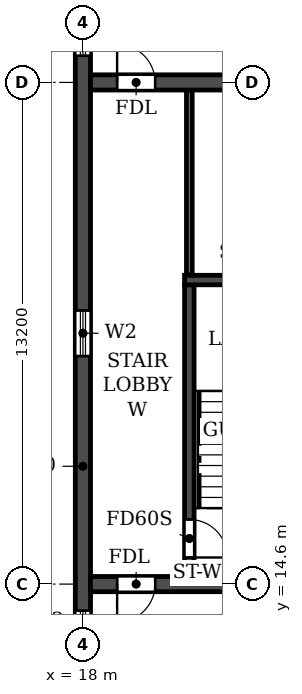
"""IFC4 building model, lengths in metres.
Left out: names, types, materials, properties, quantities, classifications, styles, units other than length and angle.
Written with IfcOpenShell. Run it as: python <this file> out.ifc"""

import sys

from ifc_helpers import new_model, si_unit, direction, frame, frame_2d, origin, place, context, subcontext, project, spatial, rectangle, extrude, element, fill, save


model = new_model("IFC4")
c1 = context("Model", 3, precision=1e-05, world=origin(), true_north=direction((0.0, 1.0)))
c2 = subcontext(c1, "Body", "Model", "MODEL_VIEW")
j1 = project(units=[si_unit("LENGTHUNIT", "METRE"), si_unit("PLANEANGLEUNIT", "RADIAN")], contexts=[c1])
p1 = place(None, origin())
s1 = spatial("IfcSite", under=j1, at=p1, CompositionType="ELEMENT")
p2 = place(p1, origin())
s2 = spatial("IfcBuilding", under=s1, at=p2, CompositionType="ELEMENT")
p3 = place(p2, frame((0.0, 0.0, 208.2)))
s3 = spatial("IfcBuildingStorey", under=s2, at=p3, CompositionType="ELEMENT", Elevation=208.2)
p4 = place(p3, frame((18.0, 4.683, 0.0), z_axis=(0.0, 0.0, 1.0), x_axis=(0.0, 1.0, 0.0)))
e1 = element("IfcWall", 1, at=p4, inside=s3, PredefinedType="SHEAR", context=c2, shape_type="SweptSolid", body=[
    extrude(rectangle(XDim=31.834, YDim=0.4, at=frame_2d((15.917, 0.0))), origin(), (0.0, 0.0, 1.0), 3.0),
])
p5 = place(p4, frame((23.817, 0.0, 0.9)))
e2 = element("IfcOpeningElement", 2, at=p5, cuts=e1, PredefinedType="OPENING", context=c2, shape_type="SweptSolid", body=[
    extrude(rectangle(XDim=1.2, YDim=1.5, at=frame_2d((0.6, 0.75))), frame((0.0, 0.21, 0.0), z_axis=(0.0, -1.0, 0.0), x_axis=(1.0, 0.0, 0.0)), (0.0, 0.0, 1.0), 0.42),
])
p6 = place(p4, frame((8.017, 0.0, 0.9)))
e3 = element("IfcOpeningElement", 3, at=p6, cuts=e1, PredefinedType="OPENING", context=c2, shape_type="SweptSolid", body=[
    extrude(rectangle(XDim=1.2, YDim=1.5, at=frame_2d((0.6, 0.75))), frame((0.0, 0.21, 0.0), z_axis=(0.0, -1.0, 0.0), x_axis=(1.0, 0.0, 0.0)), (0.0, 0.0, 1.0), 0.42),
])
p7 = place(p4, frame((27.694, 0.0, 0.6)))
e4 = element("IfcOpeningElement", 4, at=p7, cuts=e1, PredefinedType="OPENING", context=c2, shape_type="SweptSolid", body=[
    extrude(rectangle(XDim=2.2, YDim=1.8, at=frame_2d((1.1, 0.9))), frame((0.0, 0.21, 0.0), z_axis=(0.0, -1.0, 0.0), x_axis=(1.0, 0.0, 0.0)), (0.0, 0.0, 1.0), 0.42),
])
p8 = place(p4, frame((2.541, 0.0, 0.6)))
e5 = element("IfcOpeningElement", 5, at=p8, cuts=e1, PredefinedType="OPENING", context=c2, shape_type="SweptSolid", body=[
    extrude(rectangle(XDim=2.2, YDim=1.8, at=frame_2d((1.1, 0.9))), frame((0.0, 0.21, 0.0), z_axis=(0.0, -1.0, 0.0), x_axis=(1.0, 0.0, 0.0)), (0.0, 0.0, 1.0), 0.42),
])
p9 = place(p4, frame((15.917, 0.0, 0.9)))
e6 = element("IfcOpeningElement", 6, at=p9, cuts=e1, PredefinedType="OPENING", context=c2, shape_type="SweptSolid", body=[
    extrude(rectangle(XDim=1.2, YDim=1.5, at=frame_2d((0.6, 0.75))), frame((0.0, 0.21, 0.0), z_axis=(0.0, -1.0, 0.0), x_axis=(1.0, 0.0, 0.0)), (0.0, 0.0, 1.0), 0.42),
])
p10 = place(p3, frame((18.2, 14.6, 0.0), z_axis=(0.0, 0.0, 1.0), x_axis=(1.0, 0.0, 0.0)))
e7 = element("IfcWall", 7, at=p10, inside=s3, PredefinedType="SOLIDWALL", context=c2, shape_type="SweptSolid", body=[
    extrude(rectangle(XDim=65.6, YDim=0.4, at=frame_2d((32.8, 0.0))), origin(), (0.0, 0.0, 1.0), 3.0),
])
p11 = place(p10, frame((0.7, 0.0, 0.0)))
e8 = element("IfcOpeningElement", 8, at=p11, cuts=e7, PredefinedType="OPENING", context=c2, shape_type="SweptSolid", body=[
    extrude(rectangle(XDim=1.0, YDim=2.1, at=frame_2d((0.5, 1.05))), frame((0.0, 0.21, 0.0), z_axis=(0.0, -1.0, 0.0), x_axis=(1.0, 0.0, 0.0)), (0.0, 0.0, 1.0), 0.42),
])
p12 = place(p10, frame((8.6, 0.0, 0.0)))
e9 = element("IfcOpeningElement", 9, at=p12, cuts=e7, PredefinedType="OPENING", context=c2, shape_type="SweptSolid", body=[
    extrude(rectangle(XDim=1.0, YDim=2.1, at=frame_2d((0.5, 1.05))), frame((0.0, 0.21, 0.0), z_axis=(0.0, -1.0, 0.0), x_axis=(1.0, 0.0, 0.0)), (0.0, 0.0, 1.0), 0.42),
])
p13 = place(p10, frame((13.2, 0.0, 0.0)))
e10 = element("IfcOpeningElement", 10, at=p13, cuts=e7, PredefinedType="OPENING", context=c2, shape_type="SweptSolid", body=[
    extrude(rectangle(XDim=1.0, YDim=2.1, at=frame_2d((0.5, 1.05))), frame((0.0, 0.21, 0.0), z_axis=(0.0, -1.0, 0.0), x_axis=(1.0, 0.0, 0.0)), (0.0, 0.0, 1.0), 0.42),
])
p14 = place(p10, frame((27.1, 0.0, 0.0)))
e11 = element("IfcOpeningElement", 11, at=p14, cuts=e7, PredefinedType="OPENING", context=c2, shape_type="SweptSolid", body=[
    extrude(rectangle(XDim=1.0, YDim=2.1, at=frame_2d((0.5, 1.05))), frame((0.0, 0.21, 0.0), z_axis=(0.0, -1.0, 0.0), x_axis=(1.0, 0.0, 0.0)), (0.0, 0.0, 1.0), 0.42),
])
p15 = place(p10, frame((32.3, 0.0, 0.0)))
e12 = element("IfcOpeningElement", 12, at=p15, cuts=e7, PredefinedType="OPENING", context=c2, shape_type="SweptSolid", body=[
    extrude(rectangle(XDim=1.0, YDim=2.1, at=frame_2d((0.5, 1.05))), frame((0.0, 0.21, 0.0), z_axis=(0.0, -1.0, 0.0), x_axis=(1.0, 0.0, 0.0)), (0.0, 0.0, 1.0), 0.42),
])
p16 = place(p10, frame((34.9, 0.0, 0.0)))
e13 = element("IfcOpeningElement", 13, at=p16, cuts=e7, PredefinedType="OPENING", context=c2, shape_type="SweptSolid", body=[
    extrude(rectangle(XDim=1.0, YDim=2.1, at=frame_2d((0.5, 1.05))), frame((0.0, 0.21, 0.0), z_axis=(0.0, -1.0, 0.0), x_axis=(1.0, 0.0, 0.0)), (0.0, 0.0, 1.0), 0.42),
])
p17 = place(p10, frame((38.8, 0.0, 0.0)))
e14 = element("IfcOpeningElement", 14, at=p17, cuts=e7, PredefinedType="OPENING", context=c2, shape_type="SweptSolid", body=[
    extrude(rectangle(XDim=1.0, YDim=2.1, at=frame_2d((0.5, 1.05))), frame((0.0, 0.21, 0.0), z_axis=(0.0, -1.0, 0.0), x_axis=(1.0, 0.0, 0.0)), (0.0, 0.0, 1.0), 0.42),
])
p18 = place(p10, frame((51.4, 0.0, 0.0)))
e15 = element("IfcOpeningElement", 15, at=p18, cuts=e7, PredefinedType="OPENING", context=c2, shape_type="SweptSolid", body=[
    extrude(rectangle(XDim=1.0, YDim=2.1, at=frame_2d((0.5, 1.05))), frame((0.0, 0.21, 0.0), z_axis=(0.0, -1.0, 0.0), x_axis=(1.0, 0.0, 0.0)), (0.0, 0.0, 1.0), 0.42),
])
p19 = place(p10, frame((56.0, 0.0, 0.0)))
e16 = element("IfcOpeningElement", 16, at=p19, cuts=e7, PredefinedType="OPENING", context=c2, shape_type="SweptSolid", body=[
    extrude(rectangle(XDim=1.0, YDim=2.1, at=frame_2d((0.5, 1.05))), frame((0.0, 0.21, 0.0), z_axis=(0.0, -1.0, 0.0), x_axis=(1.0, 0.0, 0.0)), (0.0, 0.0, 1.0), 0.42),
])
p20 = place(p10, frame((63.9, 0.0, 0.0)))
e17 = element("IfcOpeningElement", 17, at=p20, cuts=e7, PredefinedType="OPENING", context=c2, shape_type="SweptSolid", body=[
    extrude(rectangle(XDim=1.0, YDim=2.1, at=frame_2d((0.5, 1.05))), frame((0.0, 0.21, 0.0), z_axis=(0.0, -1.0, 0.0), x_axis=(1.0, 0.0, 0.0)), (0.0, 0.0, 1.0), 0.42),
])
p21 = place(p3, frame((18.2, 27.8, 0.0), z_axis=(0.0, 0.0, 1.0), x_axis=(1.0, 0.0, 0.0)))
e18 = element("IfcWall", 18, at=p21, inside=s3, PredefinedType="SOLIDWALL", context=c2, shape_type="SweptSolid", body=[
    extrude(rectangle(XDim=65.6, YDim=0.4, at=frame_2d((32.8, 0.0))), origin(), (0.0, 0.0, 1.0), 3.0),
])
p22 = place(p21, frame((0.7, 0.0, 0.0)))
e19 = element("IfcOpeningElement", 19, at=p22, cuts=e18, PredefinedType="OPENING", context=c2, shape_type="SweptSolid", body=[
    extrude(rectangle(XDim=1.0, YDim=2.1, at=frame_2d((0.5, 1.05))), frame((0.0, 0.21, 0.0), z_axis=(0.0, -1.0, 0.0), x_axis=(1.0, 0.0, 0.0)), (0.0, 0.0, 1.0), 0.42),
])
p23 = place(p21, frame((4.05, 0.0, 0.0)))
e20 = element("IfcOpeningElement", 20, at=p23, cuts=e18, PredefinedType="OPENING", context=c2, shape_type="SweptSolid", body=[
    extrude(rectangle(XDim=0.9, YDim=2.1, at=frame_2d((0.45, 1.05))), frame((0.0, 0.21, 0.0), z_axis=(0.0, -1.0, 0.0), x_axis=(1.0, 0.0, 0.0)), (0.0, 0.0, 1.0), 0.42),
])
p24 = place(p21, frame((13.25, 0.0, 0.0)))
e21 = element("IfcOpeningElement", 21, at=p24, cuts=e18, PredefinedType="OPENING", context=c2, shape_type="SweptSolid", body=[
    extrude(rectangle(XDim=0.9, YDim=2.1, at=frame_2d((0.45, 1.05))), frame((0.0, 0.21, 0.0), z_axis=(0.0, -1.0, 0.0), x_axis=(1.0, 0.0, 0.0)), (0.0, 0.0, 1.0), 0.42),
])
p25 = place(p21, frame((17.7, 0.0, 0.0)))
e22 = element("IfcOpeningElement", 22, at=p25, cuts=e18, PredefinedType="OPENING", context=c2, shape_type="SweptSolid", body=[
    extrude(rectangle(XDim=1.0, YDim=2.1, at=frame_2d((0.5, 1.05))), frame((0.0, 0.21, 0.0), z_axis=(0.0, -1.0, 0.0), x_axis=(1.0, 0.0, 0.0)), (0.0, 0.0, 1.0), 0.42),
])
p26 = place(p21, frame((22.9, 0.0, 0.0)))
e23 = element("IfcOpeningElement", 23, at=p26, cuts=e18, PredefinedType="OPENING", context=c2, shape_type="SweptSolid", body=[
    extrude(rectangle(XDim=1.0, YDim=2.1, at=frame_2d((0.5, 1.05))), frame((0.0, 0.21, 0.0), z_axis=(0.0, -1.0, 0.0), x_axis=(1.0, 0.0, 0.0)), (0.0, 0.0, 1.0), 0.42),
])
p27 = place(p21, frame((29.4, 0.0, 0.0)))
e24 = element("IfcOpeningElement", 24, at=p27, cuts=e18, PredefinedType="OPENING", context=c2, shape_type="SweptSolid", body=[
    extrude(rectangle(XDim=1.0, YDim=2.1, at=frame_2d((0.5, 1.05))), frame((0.0, 0.21, 0.0), z_axis=(0.0, -1.0, 0.0), x_axis=(1.0, 0.0, 0.0)), (0.0, 0.0, 1.0), 0.42),
])
p28 = place(p21, frame((32.3, 0.0, 0.0)))
e25 = element("IfcOpeningElement", 25, at=p28, cuts=e18, PredefinedType="OPENING", context=c2, shape_type="SweptSolid", body=[
    extrude(rectangle(XDim=1.0, YDim=2.1, at=frame_2d((0.5, 1.05))), frame((0.0, 0.21, 0.0), z_axis=(0.0, -1.0, 0.0), x_axis=(1.0, 0.0, 0.0)), (0.0, 0.0, 1.0), 0.42),
])
p29 = place(p21, frame((35.2, 0.0, 0.0)))
e26 = element("IfcOpeningElement", 26, at=p29, cuts=e18, PredefinedType="OPENING", context=c2, shape_type="SweptSolid", body=[
    extrude(rectangle(XDim=1.0, YDim=2.1, at=frame_2d((0.5, 1.05))), frame((0.0, 0.21, 0.0), z_axis=(0.0, -1.0, 0.0), x_axis=(1.0, 0.0, 0.0)), (0.0, 0.0, 1.0), 0.42),
])
p30 = place(p21, frame((37.8, 0.0, 0.0)))
e27 = element("IfcOpeningElement", 27, at=p30, cuts=e18, PredefinedType="OPENING", context=c2, shape_type="SweptSolid", body=[
    extrude(rectangle(XDim=1.0, YDim=2.1, at=frame_2d((0.5, 1.05))), frame((0.0, 0.21, 0.0), z_axis=(0.0, -1.0, 0.0), x_axis=(1.0, 0.0, 0.0)), (0.0, 0.0, 1.0), 0.42),
])
p31 = place(p21, frame((40.4, 0.0, 0.0)))
e28 = element("IfcOpeningElement", 28, at=p31, cuts=e18, PredefinedType="OPENING", context=c2, shape_type="SweptSolid", body=[
    extrude(rectangle(XDim=1.0, YDim=2.1, at=frame_2d((0.5, 1.05))), frame((0.0, 0.21, 0.0), z_axis=(0.0, -1.0, 0.0), x_axis=(1.0, 0.0, 0.0)), (0.0, 0.0, 1.0), 0.42),
])
p32 = place(p21, frame((43.0, 0.0, 0.0)))
e29 = element("IfcOpeningElement", 29, at=p32, cuts=e18, PredefinedType="OPENING", context=c2, shape_type="SweptSolid", body=[
    extrude(rectangle(XDim=1.0, YDim=2.1, at=frame_2d((0.5, 1.05))), frame((0.0, 0.21, 0.0), z_axis=(0.0, -1.0, 0.0), x_axis=(1.0, 0.0, 0.0)), (0.0, 0.0, 1.0), 0.42),
])
p33 = place(p21, frame((46.9, 0.0, 0.0)))
e30 = element("IfcOpeningElement", 30, at=p33, cuts=e18, PredefinedType="OPENING", context=c2, shape_type="SweptSolid", body=[
    extrude(rectangle(XDim=1.0, YDim=2.1, at=frame_2d((0.5, 1.05))), frame((0.0, 0.21, 0.0), z_axis=(0.0, -1.0, 0.0), x_axis=(1.0, 0.0, 0.0)), (0.0, 0.0, 1.0), 0.42),
])
p34 = place(p21, frame((51.45, 0.0, 0.0)))
e31 = element("IfcOpeningElement", 31, at=p34, cuts=e18, PredefinedType="OPENING", context=c2, shape_type="SweptSolid", body=[
    extrude(rectangle(XDim=0.9, YDim=2.1, at=frame_2d((0.45, 1.05))), frame((0.0, 0.21, 0.0), z_axis=(0.0, -1.0, 0.0), x_axis=(1.0, 0.0, 0.0)), (0.0, 0.0, 1.0), 0.42),
])
p35 = place(p21, frame((60.65, 0.0, 0.0)))
e32 = element("IfcOpeningElement", 32, at=p35, cuts=e18, PredefinedType="OPENING", context=c2, shape_type="SweptSolid", body=[
    extrude(rectangle(XDim=0.9, YDim=2.1, at=frame_2d((0.45, 1.05))), frame((0.0, 0.21, 0.0), z_axis=(0.0, -1.0, 0.0), x_axis=(1.0, 0.0, 0.0)), (0.0, 0.0, 1.0), 0.42),
])
p36 = place(p21, frame((63.9, 0.0, 0.0)))
e33 = element("IfcOpeningElement", 33, at=p36, cuts=e18, PredefinedType="OPENING", context=c2, shape_type="SweptSolid", body=[
    extrude(rectangle(XDim=1.0, YDim=2.1, at=frame_2d((0.5, 1.05))), frame((0.0, 0.21, 0.0), z_axis=(0.0, -1.0, 0.0), x_axis=(1.0, 0.0, 0.0)), (0.0, 0.0, 1.0), 0.42),
])
p37 = place(p3, frame((20.8, 14.8, 0.0), z_axis=(0.0, 0.0, 1.0), x_axis=(0.0, 1.0, 0.0)))
e34 = element("IfcWall", 34, at=p37, inside=s3, PredefinedType="SOLIDWALL", context=c2, shape_type="SweptSolid", body=[
    extrude(rectangle(XDim=7.675, YDim=0.25, at=frame_2d((3.837, 0.0))), origin(), (0.0, 0.0, 1.0), 3.0),
])
p38 = place(p37, frame((0.5, 0.0, 0.0)))
e35 = element("IfcOpeningElement", 35, at=p38, cuts=e34, PredefinedType="OPENING", context=c2, shape_type="SweptSolid", body=[
    extrude(rectangle(XDim=1.0, YDim=2.1, at=frame_2d((0.5, 1.05))), frame((0.0, 0.135, 0.0), z_axis=(0.0, -1.0, 0.0), x_axis=(1.0, 0.0, 0.0)), (0.0, 0.0, 1.0), 0.27),
])
p39 = place(p3, frame((20.675, 22.6, 0.0), z_axis=(0.0, 0.0, 1.0), x_axis=(1.0, 0.0, 0.0)))
e36 = element("IfcWall", 36, at=p39, inside=s3, PredefinedType="SOLIDWALL", context=c2, shape_type="SweptSolid", body=[
    extrude(rectangle(XDim=4.05, YDim=0.25, at=frame_2d((2.025, 0.0))), origin(), (0.0, 0.0, 1.0), 3.0),
])
p40 = place(p3, frame((20.8, 22.735, 0.0), z_axis=(0.0, 0.0, 1.0), x_axis=(0.0, 1.0, 0.0)))
e37 = element("IfcWall", 37, at=p40, inside=s3, PredefinedType="PARTITIONING", context=c2, shape_type="SweptSolid", body=[
    extrude(rectangle(XDim=4.855, YDim=0.15, at=frame_2d((2.427, 0.0))), origin(), (0.0, 0.0, 1.0), 3.0),
])
p41 = place(p5, origin())
e38 = element("IfcWindow", 38, at=p41, inside=s3, PartitioningType="SINGLE_PANEL", PredefinedType="WINDOW", context=c2, shape_type="SweptSolid", body=[
    extrude(rectangle(XDim=1.2, YDim=1.5, at=frame_2d((0.6, 0.75))), frame((0.0, 0.03, 0.0), z_axis=(0.0, -1.0, 0.0), x_axis=(1.0, 0.0, 0.0)), (0.0, 0.0, 1.0), 0.06),
])
fill(e2, e38)
p42 = place(p6, origin())
e39 = element("IfcWindow", 39, at=p42, inside=s3, PartitioningType="SINGLE_PANEL", PredefinedType="WINDOW", context=c2, shape_type="SweptSolid", body=[
    extrude(rectangle(XDim=1.2, YDim=1.5, at=frame_2d((0.6, 0.75))), frame((0.0, 0.03, 0.0), z_axis=(0.0, -1.0, 0.0), x_axis=(1.0, 0.0, 0.0)), (0.0, 0.0, 1.0), 0.06),
])
fill(e3, e39)
p43 = place(p9, origin())
e40 = element("IfcWindow", 40, at=p43, inside=s3, PartitioningType="SINGLE_PANEL", PredefinedType="WINDOW", context=c2, shape_type="SweptSolid", body=[
    extrude(rectangle(XDim=1.2, YDim=1.5, at=frame_2d((0.6, 0.75))), frame((0.0, 0.03, 0.0), z_axis=(0.0, -1.0, 0.0), x_axis=(1.0, 0.0, 0.0)), (0.0, 0.0, 1.0), 0.06),
])
fill(e6, e40)
p44 = place(p22, origin())
e41 = element("IfcDoor", 41, at=p44, inside=s3, OperationType="SINGLE_SWING_LEFT", PredefinedType="DOOR", context=c2, shape_type="SweptSolid", body=[
    extrude(rectangle(XDim=1.0, YDim=2.1, at=frame_2d((0.5, 1.05))), frame((0.0, 0.025, 0.0), z_axis=(0.0, -1.0, 0.0), x_axis=(1.0, 0.0, 0.0)), (0.0, 0.0, 1.0), 0.05),
])
fill(e19, e41)
p45 = place(p11, frame((1.0, 0.0, 0.0), z_axis=(0.0, 0.0, 1.0), x_axis=(-1.0, 0.0, 0.0)))
e42 = element("IfcDoor", 42, at=p45, inside=s3, OperationType="SINGLE_SWING_RIGHT", PredefinedType="DOOR", context=c2, shape_type="SweptSolid", body=[
    extrude(rectangle(XDim=1.0, YDim=2.1, at=frame_2d((0.5, 1.05))), frame((0.0, 0.025, 0.0), z_axis=(0.0, -1.0, 0.0), x_axis=(1.0, 0.0, 0.0)), (0.0, 0.0, 1.0), 0.05),
])
fill(e8, e42)
p46 = place(p38, frame((1.0, 0.0, 0.0), z_axis=(0.0, 0.0, 1.0), x_axis=(-1.0, 0.0, 0.0)))
e43 = element("IfcDoor", 43, at=p46, inside=s3, OperationType="SINGLE_SWING_RIGHT", PredefinedType="DOOR", context=c2, shape_type="SweptSolid", body=[
    extrude(rectangle(XDim=1.0, YDim=2.1, at=frame_2d((0.5, 1.05))), frame((0.0, 0.025, 0.0), z_axis=(0.0, -1.0, 0.0), x_axis=(1.0, 0.0, 0.0)), (0.0, 0.0, 1.0), 0.05),
])
fill(e35, e43)
save(model, sys.argv[1])
